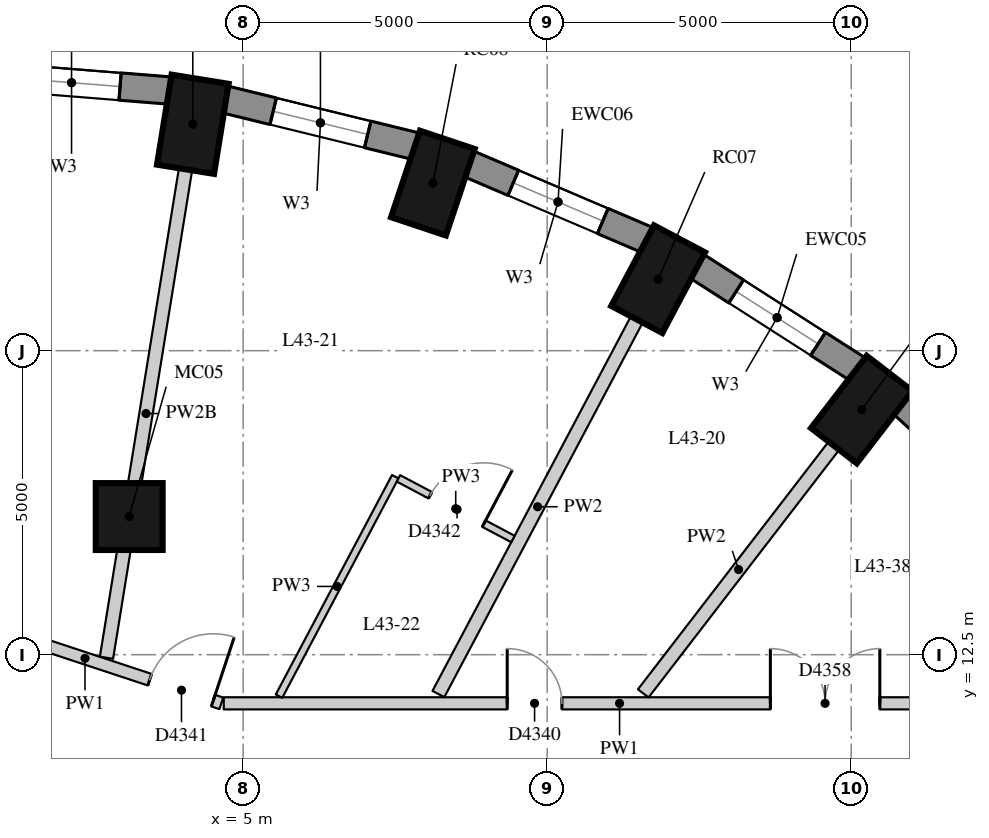
"""IFC4 building model, lengths in metres.
Left out: names, types, materials, properties, quantities, classifications, styles, units other than length and angle.
Written with IfcOpenShell. Run it as: python <this file> out.ifc"""

import sys

from ifc_helpers import new_model, si_unit, direction, frame, frame_2d, origin, origin_2d, place, context, subcontext, project, spatial, rectangle, extrude, element, fill, save


model = new_model("IFC4")
c1 = context("Model", 3, precision=1e-05, world=origin(), true_north=direction((0.0, 1.0)))
c2 = subcontext(c1, "Body", "Model", "MODEL_VIEW")
j1 = project(units=[si_unit("LENGTHUNIT", "METRE"), si_unit("PLANEANGLEUNIT", "RADIAN")], contexts=[c1])
p1 = place(None, origin())
s1 = spatial("IfcSite", under=j1, at=p1, CompositionType="ELEMENT")
p2 = place(p1, origin())
s2 = spatial("IfcBuilding", under=s1, at=p2, CompositionType="ELEMENT")
p3 = place(p2, frame((0.0, 0.0, 155.0)))
s3 = spatial("IfcBuildingStorey", under=s2, at=p3, CompositionType="ELEMENT", Elevation=155.0)
for number, where, z_axis, x_axis in (
    (1, (15.173, 16.532, 0.0), (0.0, 0.0, 1.0), (0.61, 0.792, 0.0)),
    (2, (11.825, 18.676, 0.0), (0.0, 0.0, 1.0), (0.468, 0.884, 0.0)),
    (3, (8.12, 20.256, 0.0), (0.0, 0.0, 1.0), (0.317, 0.949, 0.0)),
    (4, (4.172, 21.224, 0.0), (0.0, 0.0, 1.0), (0.16, 0.987, 0.0)),
):
    element("IfcColumn", number, at=place(p3, frame(where, z_axis=z_axis, x_axis=x_axis)), inside=s3, PredefinedType="COLUMN", context=c2, shape_type="SweptSolid", body=[
        extrude(rectangle(XDim=1.5, YDim=0.95, at=origin_2d()), origin(), (0.0, 0.0, 1.0), 3.3),
    ])
p4 = place(p3, frame((3.126, 14.772, 0.0), z_axis=(0.0, 0.0, 1.0), x_axis=(1.0, 0.0, 0.0)))
e5 = element("IfcColumn", 5, at=p4, inside=s3, PredefinedType="COLUMN", context=c2, shape_type="SweptSolid", body=[
    extrude(rectangle(XDim=1.1, YDim=1.1, at=origin_2d()), origin(), (0.0, 0.0, 1.0), 3.3),
])
p5 = place(p3, frame((18.113, 14.55, 0.0), z_axis=(0.0, 0.0, 1.0), x_axis=(-0.737808755941, 0.675009807082, 0.0)))
e6 = element("IfcWall", 6, at=p5, inside=s3, PredefinedType="SOLIDWALL", context=c2, shape_type="SweptSolid", body=[
    extrude(rectangle(XDim=3.094, YDim=0.45, at=frame_2d((1.547, 0.0))), origin(), (0.0, 0.0, 1.0), 3.02),
])
p6 = place(p3, frame((15.108, 17.193, 0.0), z_axis=(0.0, 0.0, 1.0), x_axis=(-0.842030726237, 0.539429565442, 0.0)))
e7 = element("IfcWall", 7, at=p6, inside=s3, PredefinedType="SOLIDWALL", context=c2, shape_type="SweptSolid", body=[
    extrude(rectangle(XDim=3.151, YDim=0.45, at=frame_2d((1.576, 0.0))), origin(), (0.0, 0.0, 1.0), 3.02),
])
p7 = place(p6, frame((0.776, 0.0, 0.4)))
e8 = element("IfcOpeningElement", 8, at=p7, cuts=e7, PredefinedType="OPENING", context=c2, shape_type="SweptSolid", body=[
    extrude(rectangle(XDim=1.6, YDim=1.75, at=frame_2d((0.8, 0.875))), frame((0.0, 0.235, 0.0), z_axis=(0.0, -1.0, 0.0), x_axis=(1.0, 0.0, 0.0)), (0.0, 0.0, 1.0), 0.47),
])
p8 = place(p3, frame((11.65, 19.319, 0.0), z_axis=(0.0, 0.0, 1.0), x_axis=(-0.91981046949, 0.392362969986, 0.0)))
e9 = element("IfcWall", 9, at=p8, inside=s3, PredefinedType="SOLIDWALL", context=c2, shape_type="SweptSolid", body=[
    extrude(rectangle(XDim=3.201, YDim=0.45, at=frame_2d((1.6, 0.0))), origin(), (0.0, 0.0, 1.0), 3.02),
])
p9 = place(p8, frame((0.8, 0.0, 0.4)))
e10 = element("IfcOpeningElement", 10, at=p9, cuts=e9, PredefinedType="OPENING", context=c2, shape_type="SweptSolid", body=[
    extrude(rectangle(XDim=1.6, YDim=1.75, at=frame_2d((0.8, 0.875))), frame((0.0, 0.235, 0.0), z_axis=(0.0, -1.0, 0.0), x_axis=(1.0, 0.0, 0.0)), (0.0, 0.0, 1.0), 0.47),
])
p10 = place(p3, frame((7.843, 20.862, 0.0), z_axis=(0.0, 0.0, 1.0), x_axis=(-0.971237178372, 0.238114139328, 0.0)))
e11 = element("IfcWall", 11, at=p10, inside=s3, PredefinedType="SOLIDWALL", context=c2, shape_type="SweptSolid", body=[
    extrude(rectangle(XDim=3.237, YDim=0.45, at=frame_2d((1.618, 0.0))), origin(), (0.0, 0.0, 1.0), 3.02),
])
p11 = place(p10, frame((0.818, 0.0, 0.4)))
e12 = element("IfcOpeningElement", 12, at=p11, cuts=e11, PredefinedType="OPENING", context=c2, shape_type="SweptSolid", body=[
    extrude(rectangle(XDim=1.6, YDim=1.75, at=frame_2d((0.8, 0.875))), frame((0.0, 0.235, 0.0), z_axis=(0.0, -1.0, 0.0), x_axis=(1.0, 0.0, 0.0)), (0.0, 0.0, 1.0), 0.47),
])
p12 = place(p3, frame((3.801, 21.778, 0.0), z_axis=(0.0, 0.0, 1.0), x_axis=(-0.996812416891, 0.079780984773, 0.0)))
e13 = element("IfcWall", 13, at=p12, inside=s3, PredefinedType="SOLIDWALL", context=c2, shape_type="SweptSolid", body=[
    extrude(rectangle(XDim=3.256, YDim=0.45, at=frame_2d((1.628, 0.0))), origin(), (0.0, 0.0, 1.0), 3.02),
])
p13 = place(p12, frame((0.828, 0.0, 0.4)))
e14 = element("IfcOpeningElement", 14, at=p13, cuts=e13, PredefinedType="OPENING", context=c2, shape_type="SweptSolid", body=[
    extrude(rectangle(XDim=1.6, YDim=1.75, at=frame_2d((0.8, 0.875))), frame((0.0, 0.235, 0.0), z_axis=(0.0, -1.0, 0.0), x_axis=(1.0, 0.0, 0.0)), (0.0, 0.0, 1.0), 0.47),
])
p14 = place(p3, frame((0.157, 13.181, 0.0), z_axis=(0.0, 0.0, 1.0), x_axis=(0.949543217684, -0.313636218811, 0.0)))
e15 = element("IfcWall", 15, at=p14, inside=s3, PredefinedType="PARTITIONING", context=c2, shape_type="SweptSolid", body=[
    extrude(rectangle(XDim=4.722, YDim=0.2, at=frame_2d((2.361, 0.0))), origin(), (0.0, 0.0, 1.0), 3.02),
])
p15 = place(p14, frame((3.482, 0.0, 0.0)))
e16 = element("IfcOpeningElement", 16, at=p15, cuts=e15, PredefinedType="OPENING", context=c2, shape_type="SweptSolid", body=[
    extrude(rectangle(XDim=1.1, YDim=2.1, at=frame_2d((0.55, 1.05))), frame((0.0, 0.11, 0.0), z_axis=(0.0, -1.0, 0.0), x_axis=(1.0, 0.0, 0.0)), (0.0, 0.0, 1.0), 0.22),
])
p16 = place(p3, frame((4.681, 11.7, 0.0), z_axis=(0.0, 0.0, 1.0), x_axis=(1.0, 0.0, 0.0)))
e17 = element("IfcWall", 17, at=p16, inside=s3, PredefinedType="PARTITIONING", context=c2, shape_type="SweptSolid", body=[
    extrude(rectangle(XDim=13.019, YDim=0.2, at=frame_2d((6.51, 0.0))), origin(), (0.0, 0.0, 1.0), 3.02),
])
p17 = place(p16, frame((4.662, 0.0, 0.0)))
e18 = element("IfcOpeningElement", 18, at=p17, cuts=e17, PredefinedType="OPENING", context=c2, shape_type="SweptSolid", body=[
    extrude(rectangle(XDim=0.9, YDim=2.1, at=frame_2d((0.45, 1.05))), frame((0.0, 0.11, 0.0), z_axis=(0.0, -1.0, 0.0), x_axis=(1.0, 0.0, 0.0)), (0.0, 0.0, 1.0), 0.22),
])
p18 = place(p16, frame((8.99, 0.0, 0.0)))
e19 = element("IfcOpeningElement", 19, at=p18, cuts=e17, PredefinedType="OPENING", context=c2, shape_type="SweptSolid", body=[
    extrude(rectangle(XDim=1.8, YDim=2.1, at=frame_2d((0.9, 1.05))), frame((0.0, 0.11, 0.0), z_axis=(0.0, -1.0, 0.0), x_axis=(1.0, 0.0, 0.0)), (0.0, 0.0, 1.0), 0.22),
])
p19 = place(p3, frame((14.716, 15.937, 0.0), z_axis=(0.0, 0.0, 1.0), x_axis=(-0.609997597499, -0.792403262894, 0.0)))
e20 = element("IfcWall", 20, at=p19, inside=s3, PredefinedType="PARTITIONING", context=c2, shape_type="SweptSolid", body=[
    extrude(rectangle(XDim=5.141, YDim=0.22, at=frame_2d((2.57, 0.0))), origin(), (0.0, 0.0, 1.0), 3.02),
])
p20 = place(p3, frame((11.474, 18.013, 0.0), z_axis=(0.0, 0.0, 1.0), x_axis=(-0.468047008097, -0.883703569197, 0.0)))
e21 = element("IfcWall", 21, at=p20, inside=s3, PredefinedType="PARTITIONING", context=c2, shape_type="SweptSolid", body=[
    extrude(rectangle(XDim=6.971, YDim=0.22, at=frame_2d((3.486, 0.0))), origin(), (0.0, 0.0, 1.0), 3.02),
])
p21 = place(p3, frame((4.052, 20.484, 0.0), z_axis=(0.0, 0.0, 1.0), x_axis=(-0.159683255106, -0.987168302793, 0.0)))
e22 = element("IfcWall", 22, at=p21, inside=s3, PredefinedType="PARTITIONING", context=c2, shape_type="SweptSolid", body=[
    extrude(rectangle(XDim=8.138, YDim=0.22, at=frame_2d((4.069, 0.0))), origin(), (0.0, 0.0, 1.0), 2.57),
])
p22 = place(p3, frame((5.59, 11.818, 0.0), z_axis=(0.0, 0.0, 1.0), x_axis=(0.468055206857, 0.883699226736, 0.0)))
e23 = element("IfcWall", 23, at=p22, inside=s3, PredefinedType="PARTITIONING", context=c2, shape_type="SweptSolid", body=[
    extrude(rectangle(XDim=4.085, YDim=0.12, at=frame_2d((2.042, 0.0))), origin(), (0.0, 0.0, 1.0), 3.02),
])
p23 = place(p3, frame((7.555, 15.4, 0.0), z_axis=(0.0, 0.0, 1.0), x_axis=(0.883681952223, -0.468087820088, 0.0)))
e24 = element("IfcWall", 24, at=p23, inside=s3, PredefinedType="PARTITIONING", context=c2, shape_type="SweptSolid", body=[
    extrude(rectangle(XDim=2.13, YDim=0.12, at=frame_2d((1.065, 0.0))), origin(), (0.0, 0.0, 1.0), 3.02),
])
p24 = place(p23, frame((0.59, 0.0, 0.0)))
e25 = element("IfcOpeningElement", 25, at=p24, cuts=e24, PredefinedType="OPENING", context=c2, shape_type="SweptSolid", body=[
    extrude(rectangle(XDim=1.0, YDim=2.1, at=frame_2d((0.5, 1.05))), frame((0.0, 0.07, 0.0), z_axis=(0.0, -1.0, 0.0), x_axis=(1.0, 0.0, 0.0)), (0.0, 0.0, 1.0), 0.14),
])
p25 = place(p7, origin())
e26 = element("IfcWindow", 26, at=p25, inside=s3, PartitioningType="SINGLE_PANEL", PredefinedType="WINDOW", context=c2, shape_type="SweptSolid", body=[
    extrude(rectangle(XDim=1.6, YDim=1.75, at=frame_2d((0.8, 0.875))), frame((0.0, 0.035, 0.0), z_axis=(0.0, -1.0, 0.0), x_axis=(1.0, 0.0, 0.0)), (0.0, 0.0, 1.0), 0.06),
])
fill(e8, e26)
p26 = place(p9, origin())
e27 = element("IfcWindow", 27, at=p26, inside=s3, PartitioningType="SINGLE_PANEL", PredefinedType="WINDOW", context=c2, shape_type="SweptSolid", body=[
    extrude(rectangle(XDim=1.6, YDim=1.75, at=frame_2d((0.8, 0.875))), frame((0.0, 0.035, 0.0), z_axis=(0.0, -1.0, 0.0), x_axis=(1.0, 0.0, 0.0)), (0.0, 0.0, 1.0), 0.06),
])
fill(e10, e27)
p27 = place(p11, origin())
e28 = element("IfcWindow", 28, at=p27, inside=s3, PartitioningType="SINGLE_PANEL", PredefinedType="WINDOW", context=c2, shape_type="SweptSolid", body=[
    extrude(rectangle(XDim=1.6, YDim=1.75, at=frame_2d((0.8, 0.875))), frame((0.0, 0.035, 0.0), z_axis=(0.0, -1.0, 0.0), x_axis=(1.0, 0.0, 0.0)), (0.0, 0.0, 1.0), 0.06),
])
fill(e12, e28)
p28 = place(p13, origin())
e29 = element("IfcWindow", 29, at=p28, inside=s3, PartitioningType="SINGLE_PANEL", PredefinedType="WINDOW", context=c2, shape_type="SweptSolid", body=[
    extrude(rectangle(XDim=1.6, YDim=1.75, at=frame_2d((0.8, 0.875))), frame((0.0, 0.035, 0.0), z_axis=(0.0, -1.0, 0.0), x_axis=(1.0, 0.0, 0.0)), (0.0, 0.0, 1.0), 0.06),
])
fill(e14, e29)
p29 = place(p17, origin())
e30 = element("IfcDoor", 30, at=p29, inside=s3, OperationType="SINGLE_SWING_LEFT", PredefinedType="DOOR", context=c2, shape_type="SweptSolid", body=[
    extrude(rectangle(XDim=0.9, YDim=2.1, at=frame_2d((0.45, 1.05))), frame((0.0, 0.025, 0.0), z_axis=(0.0, -1.0, 0.0), x_axis=(1.0, 0.0, 0.0)), (0.0, 0.0, 1.0), 0.05),
])
fill(e18, e30)
p30 = place(p15, origin())
e31 = element("IfcDoor", 31, at=p30, inside=s3, OperationType="SINGLE_SWING_RIGHT", PredefinedType="DOOR", context=c2, shape_type="SweptSolid", body=[
    extrude(rectangle(XDim=1.1, YDim=2.1, at=frame_2d((0.55, 1.05))), frame((0.0, 0.025, 0.0), z_axis=(0.0, -1.0, 0.0), x_axis=(1.0, 0.0, 0.0)), (0.0, 0.0, 1.0), 0.05),
])
fill(e16, e31)
p31 = place(p24, origin())
e32 = element("IfcDoor", 32, at=p31, inside=s3, OperationType="SINGLE_SWING_RIGHT", PredefinedType="DOOR", context=c2, shape_type="SweptSolid", body=[
    extrude(rectangle(XDim=1.0, YDim=2.1, at=frame_2d((0.5, 1.05))), frame((0.0, 0.025, 0.0), z_axis=(0.0, -1.0, 0.0), x_axis=(1.0, 0.0, 0.0)), (0.0, 0.0, 1.0), 0.05),
])
fill(e25, e32)
p32 = place(p18, origin())
e33 = element("IfcDoor", 33, at=p32, inside=s3, OperationType="DOUBLE_DOOR_SINGLE_SWING", PredefinedType="DOOR", context=c2, shape_type="SweptSolid", body=[
    extrude(rectangle(XDim=1.8, YDim=2.1, at=frame_2d((0.9, 1.05))), frame((0.0, 0.025, 0.0), z_axis=(0.0, -1.0, 0.0), x_axis=(1.0, 0.0, 0.0)), (0.0, 0.0, 1.0), 0.05),
])
fill(e19, e33)
save(model, sys.argv[1])
